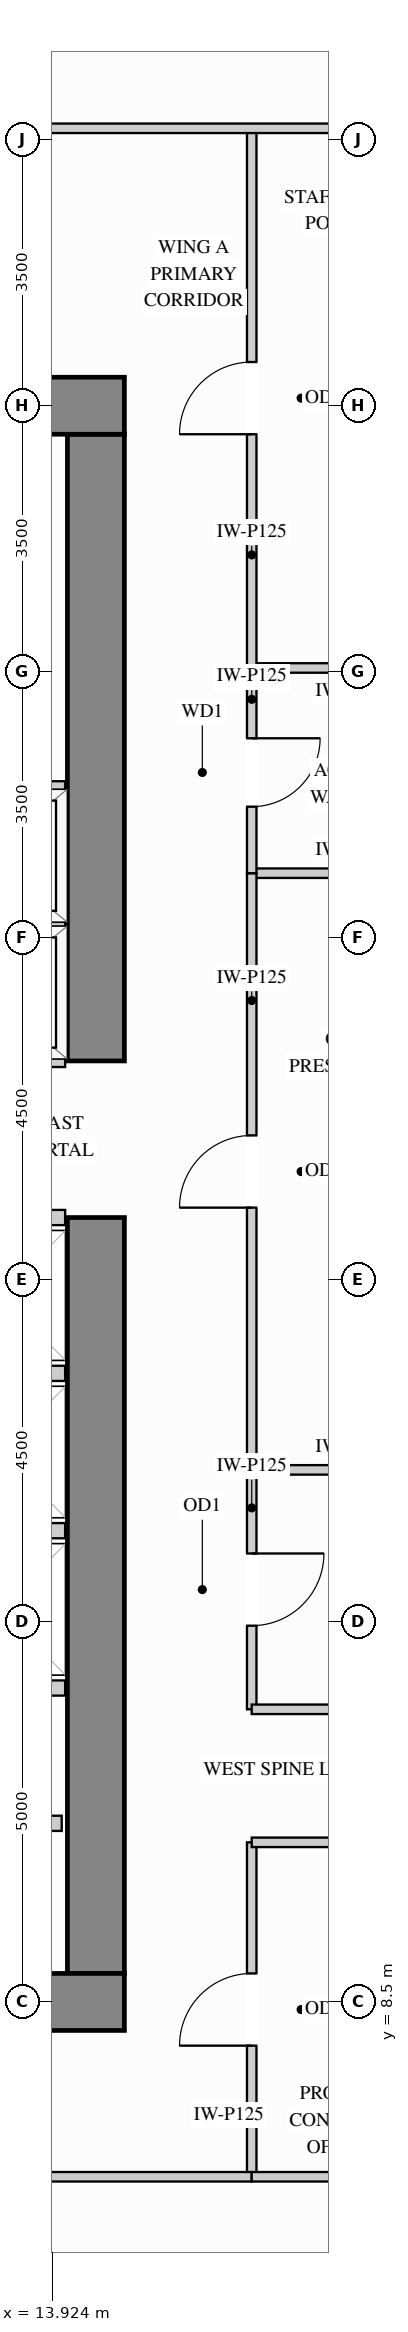
"""IFC4 building model, lengths in metres.
Left out: names, types, materials, properties, quantities, classifications, styles, units other than length and angle.
Written with IfcOpenShell. Run it as: python <this file> out.ifc"""

import sys

from ifc_helpers import new_model, si_unit, direction, frame, frame_2d, origin, place, context, subcontext, project, spatial, rectangle, extrude, source, transform, mapped, element, fill, save


model = new_model("IFC4")
c1 = context("Model", 3, precision=1e-05, world=origin(), true_north=direction((0.0, 1.0)))
c2 = subcontext(c1, "Body", "Model", "MODEL_VIEW")
j1 = project(units=[si_unit("LENGTHUNIT", "METRE"), si_unit("PLANEANGLEUNIT", "RADIAN")], contexts=[c1])
p1 = place(None, origin())
s1 = spatial("IfcSite", under=j1, at=p1, CompositionType="ELEMENT")
p2 = place(p1, origin())
s2 = spatial("IfcBuilding", under=s1, at=p2, CompositionType="ELEMENT")
p3 = place(p2, frame((0.0, 0.0, 109.8)))
s3 = spatial("IfcBuildingStorey", under=s2, at=p3, CompositionType="ELEMENT", Elevation=109.8)
m1 = source(origin(), c2, "Body", "SweptSolid", [
    extrude(rectangle(XDim=9.945, YDim=0.75, at=frame_2d((4.973, 0.0))), origin(), (0.0, 0.0, 1.0), 3.38),
])
p4 = place(p3, frame((14.5, 8.875, 0.0), z_axis=(0.0, 0.0, 1.0), x_axis=(0.0, 1.0, 0.0)))
e1 = element("IfcWall", 1, at=p4, inside=s3, PredefinedType="SHEAR", context=c2, shape_type="MappedRepresentation", body=[
    mapped(m1, transform((0.0, 0.0, 0.0), x_axis=(1.0, 0.0, 0.0), y_axis=(0.0, 1.0, 0.0), z_axis=(0.0, 0.0, 1.0))),
])
m2 = source(origin(), c2, "Body", "SweptSolid", [
    extrude(rectangle(XDim=8.245, YDim=0.75, at=frame_2d((4.123, 0.0))), origin(), (0.0, 0.0, 1.0), 3.38),
])
p5 = place(p3, frame((14.5, 20.88, 0.0), z_axis=(0.0, 0.0, 1.0), x_axis=(0.0, 1.0, 0.0)))
e2 = element("IfcWall", 2, at=p5, inside=s3, PredefinedType="SHEAR", context=c2, shape_type="MappedRepresentation", body=[
    mapped(m2, transform((0.0, 0.0, 0.0), x_axis=(1.0, 0.0, 0.0), y_axis=(0.0, 1.0, 0.0), z_axis=(0.0, 0.0, 1.0))),
])
m3 = source(origin(), c2, "Body", "SweptSolid", [
    extrude(rectangle(XDim=10.75, YDim=0.75, at=frame_2d((5.375, 0.0))), origin(), (0.0, 0.0, 1.0), 3.38),
])
for number, where, z_axis, x_axis in (
    (3, (4.125, 29.5, 0.0), (0.0, 0.0, 1.0), (1.0, 0.0, 0.0)),
    (4, (4.125, 8.5, 0.0), (0.0, 0.0, 1.0), (1.0, 0.0, 0.0)),
):
    element("IfcWall", number, at=place(p3, frame(where, z_axis=z_axis, x_axis=x_axis)), inside=s3, PredefinedType="SHEAR", context=c2, shape_type="MappedRepresentation", body=[
        mapped(m3, transform((0.0, 0.0, 0.0), x_axis=(1.0, 0.0, 0.0), y_axis=(0.0, 1.0, 0.0), z_axis=(0.0, 0.0, 1.0))),
    ])
m4 = source(origin(), c2, "Body", "SweptSolid", [
    extrude(rectangle(XDim=2.6, YDim=0.125, at=frame_2d((1.3, 0.0))), origin(), (0.0, 0.0, 1.0), 3.365),
])
p6 = place(p3, frame((16.55, 15.5, 0.0), z_axis=(0.0, 0.0, 1.0), x_axis=(1.0, 0.0, 0.0)))
e5 = element("IfcWall", 5, at=p6, inside=s3, PredefinedType="PARTITIONING", context=c2, shape_type="MappedRepresentation", body=[
    mapped(m4, transform((0.0, 0.0, 0.0), x_axis=(1.0, 0.0, 0.0), y_axis=(0.0, 1.0, 0.0), z_axis=(0.0, 0.0, 1.0))),
])
m5 = source(origin(), c2, "Body", "SweptSolid", [
    extrude(rectangle(XDim=2.598, YDim=0.125, at=frame_2d((1.299, 0.0))), origin(), (0.0, 0.0, 1.0), 3.365),
])
for number, where, z_axis, x_axis in (
    (6, (16.55, 23.35, 0.0), (0.0, 0.0, 1.0), (1.0, 0.0, 0.0)),
    (7, (16.55, 26.05, 0.0), (0.0, 0.0, 1.0), (1.0, 0.0, 0.0)),
):
    element("IfcWall", number, at=place(p3, frame(where, z_axis=z_axis, x_axis=x_axis)), inside=s3, PredefinedType="PARTITIONING", context=c2, shape_type="MappedRepresentation", body=[
        mapped(m5, transform((0.0, 0.0, 0.0), x_axis=(1.0, 0.0, 0.0), y_axis=(0.0, 1.0, 0.0), z_axis=(0.0, 0.0, 1.0))),
    ])
p7 = place(p3, frame((16.55, 12.35, 0.0), z_axis=(0.0, 0.0, 1.0), x_axis=(0.0, 1.0, 0.0)))
e8 = element("IfcWall", 8, at=p7, inside=s3, PredefinedType="PARTITIONING", context=c2, shape_type="SweptSolid", body=[
    extrude(rectangle(XDim=3.15, YDim=0.125, at=frame_2d((1.575, 0.0))), origin(), (0.0, 0.0, 1.0), 3.365),
])
p8 = place(p7, frame((1.1, 0.0, 0.0)))
e9 = element("IfcOpeningElement", 9, at=p8, cuts=e8, PredefinedType="OPENING", context=c2, shape_type="SweptSolid", body=[
    extrude(rectangle(XDim=0.95, YDim=2.15, at=frame_2d((0.475, 1.075))), frame((0.0, 0.073, 0.0), z_axis=(0.0, -1.0, 0.0), x_axis=(1.0, 0.0, 0.0)), (0.0, 0.0, 1.0), 0.145),
])
p9 = place(p3, frame((16.55, 15.5, 0.0), z_axis=(0.0, 0.0, 1.0), x_axis=(0.0, 1.0, 0.0)))
e10 = element("IfcWall", 10, at=p9, inside=s3, PredefinedType="PARTITIONING", context=c2, shape_type="SweptSolid", body=[
    extrude(rectangle(XDim=7.85, YDim=0.125, at=frame_2d((3.925, 0.0))), origin(), (0.0, 0.0, 1.0), 3.365),
])
p10 = place(p9, frame((3.45, 0.0, 0.0)))
e11 = element("IfcOpeningElement", 11, at=p10, cuts=e10, PredefinedType="OPENING", context=c2, shape_type="SweptSolid", body=[
    extrude(rectangle(XDim=0.95, YDim=2.15, at=frame_2d((0.475, 1.075))), frame((0.0, 0.073, 0.0), z_axis=(0.0, -1.0, 0.0), x_axis=(1.0, 0.0, 0.0)), (0.0, 0.0, 1.0), 0.145),
])
p11 = place(p3, frame((16.55, 26.05, 0.0), z_axis=(0.0, 0.0, 1.0), x_axis=(0.0, 1.0, 0.0)))
e12 = element("IfcWall", 12, at=p11, inside=s3, PredefinedType="PARTITIONING", context=c2, shape_type="SweptSolid", body=[
    extrude(rectangle(XDim=7.1, YDim=0.125, at=frame_2d((3.55, 0.0))), origin(), (0.0, 0.0, 1.0), 3.365),
])
p12 = place(p11, frame((3.075, 0.0, 0.0)))
e13 = element("IfcOpeningElement", 13, at=p12, cuts=e12, PredefinedType="OPENING", context=c2, shape_type="SweptSolid", body=[
    extrude(rectangle(XDim=0.95, YDim=2.15, at=frame_2d((0.475, 1.075))), frame((0.0, 0.073, 0.0), z_axis=(0.0, -1.0, 0.0), x_axis=(1.0, 0.0, 0.0)), (0.0, 0.0, 1.0), 0.145),
])
p13 = place(p3, frame((16.55, 6.2, 0.0), z_axis=(0.0, 0.0, 1.0), x_axis=(0.0, 1.0, 0.0)))
e14 = element("IfcWall", 14, at=p13, inside=s3, PredefinedType="PARTITIONING", context=c2, shape_type="SweptSolid", body=[
    extrude(rectangle(XDim=4.4, YDim=0.125, at=frame_2d((2.2, 0.0))), origin(), (0.0, 0.0, 1.0), 3.365),
])
p14 = place(p13, frame((1.725, 0.0, 0.0)))
e15 = element("IfcOpeningElement", 15, at=p14, cuts=e14, PredefinedType="OPENING", context=c2, shape_type="SweptSolid", body=[
    extrude(rectangle(XDim=0.95, YDim=2.15, at=frame_2d((0.475, 1.075))), frame((0.0, 0.073, 0.0), z_axis=(0.0, -1.0, 0.0), x_axis=(1.0, 0.0, 0.0)), (0.0, 0.0, 1.0), 0.145),
])
p15 = place(p3, frame((16.55, 23.35, 0.0), z_axis=(0.0, 0.0, 1.0), x_axis=(0.0, 1.0, 0.0)))
e16 = element("IfcWall", 16, at=p15, inside=s3, PredefinedType="PARTITIONING", context=c2, shape_type="SweptSolid", body=[
    extrude(rectangle(XDim=2.7, YDim=0.125, at=frame_2d((1.35, 0.0))), origin(), (0.0, 0.0, 1.0), 3.365),
])
p16 = place(p15, frame((0.875, 0.0, 0.0)))
e17 = element("IfcOpeningElement", 17, at=p16, cuts=e16, PredefinedType="OPENING", context=c2, shape_type="SweptSolid", body=[
    extrude(rectangle(XDim=0.9, YDim=2.15, at=frame_2d((0.45, 1.075))), frame((0.0, 0.073, 0.0), z_axis=(0.0, -1.0, 0.0), x_axis=(1.0, 0.0, 0.0)), (0.0, 0.0, 1.0), 0.145),
])
m6 = source(origin(), c2, "Body", "SweptSolid", [
    extrude(rectangle(XDim=12.598, YDim=0.125, at=frame_2d((6.299, 0.0))), origin(), (0.0, 0.0, 1.0), 3.365),
])
p17 = place(p3, frame((6.55, 33.15, 0.0), z_axis=(0.0, 0.0, 1.0), x_axis=(1.0, 0.0, 0.0)))
e18 = element("IfcWall", 18, at=p17, inside=s3, PredefinedType="PARTITIONING", context=c2, shape_type="MappedRepresentation", body=[
    mapped(m6, transform((0.0, 0.0, 0.0), x_axis=(1.0, 0.0, 0.0), y_axis=(0.0, 1.0, 0.0), z_axis=(0.0, 0.0, 1.0))),
])
m7 = source(origin(), c2, "Body", "SweptSolid", [
    extrude(rectangle(XDim=2.95, YDim=0.125, at=frame_2d((1.475, 0.0))), origin(), (0.0, 0.0, 1.0), 3.365),
])
for number, where, z_axis, x_axis in (
    (19, (16.55, 12.35, 0.0), (0.0, 0.0, 1.0), (1.0, 0.0, 0.0)),
    (20, (16.55, 10.6, 0.0), (0.0, 0.0, 1.0), (1.0, 0.0, 0.0)),
):
    element("IfcWall", number, at=place(p3, frame(where, z_axis=z_axis, x_axis=x_axis)), inside=s3, PredefinedType="PARTITIONING", context=c2, shape_type="MappedRepresentation", body=[
        mapped(m7, transform((0.0, 0.0, 0.0), x_axis=(1.0, 0.0, 0.0), y_axis=(0.0, 1.0, 0.0), z_axis=(0.0, 0.0, 1.0))),
    ])
p18 = place(p3, frame((2.45, 6.2, 0.0), z_axis=(0.0, 0.0, 1.0), x_axis=(1.0, 0.0, 0.0)))
e21 = element("IfcWall", 21, at=p18, inside=s3, PredefinedType="PARTITIONING", context=c2, shape_type="SweptSolid", body=[
    extrude(rectangle(XDim=14.1, YDim=0.125, at=frame_2d((7.05, 0.0))), origin(), (0.0, 0.0, 1.0), 2.828),
])
p19 = place(p18, frame((6.575, 0.0, 0.0)))
e22 = element("IfcOpeningElement", 22, at=p19, cuts=e21, PredefinedType="OPENING", context=c2, shape_type="SweptSolid", body=[
    extrude(rectangle(XDim=0.95, YDim=2.15, at=frame_2d((0.475, 1.075))), frame((0.0, 0.073, 0.0), z_axis=(0.0, -1.0, 0.0), x_axis=(1.0, 0.0, 0.0)), (0.0, 0.0, 1.0), 0.145),
])
m8 = source(origin(), c2, "Body", "SweptSolid", [
    extrude(rectangle(XDim=2.598, YDim=0.125, at=frame_2d((1.299, 0.0))), origin(), (0.0, 0.0, 1.0), 2.828),
])
p20 = place(p3, frame((16.55, 6.2, 0.0), z_axis=(0.0, 0.0, 1.0), x_axis=(1.0, 0.0, 0.0)))
e23 = element("IfcWall", 23, at=p20, inside=s3, PredefinedType="PARTITIONING", context=c2, shape_type="MappedRepresentation", body=[
    mapped(m8, transform((0.0, 0.0, 0.0), x_axis=(1.0, 0.0, 0.0), y_axis=(0.0, 1.0, 0.0), z_axis=(0.0, 0.0, 1.0))),
])
m9 = source(origin(), c2, "Body", "SweptSolid", [
    extrude(rectangle(XDim=1.63, YDim=0.2, at=frame_2d((0.815, 0.0))), origin(), (0.0, 0.0, 1.0), 3.365),
])
p21 = place(p3, frame((12.42, 10.85, 0.0), z_axis=(0.0, 0.0, 1.0), x_axis=(1.0, 0.0, 0.0)))
e24 = element("IfcWall", 24, at=p21, inside=s3, PredefinedType="PARTITIONING", context=c2, shape_type="MappedRepresentation", body=[
    mapped(m9, transform((0.0, 0.0, 0.0), x_axis=(1.0, 0.0, 0.0), y_axis=(0.0, 1.0, 0.0), z_axis=(0.0, 0.0, 1.0))),
])
m10 = source(origin(), c2, "Body", "SweptSolid", [
    extrude(rectangle(XDim=2.265, YDim=0.2, at=frame_2d((1.132, 0.0))), origin(), (0.0, 0.0, 1.0), 3.365),
])
for number, where, z_axis, x_axis in (
    (25, (11.83, 22.66, 0.0), (0.0, 0.0, 1.0), (1.0, 0.0, 0.0)),
    (26, (11.83, 20.9, 0.0), (0.0, 0.0, 1.0), (1.0, 0.0, 0.0)),
    (27, (11.83, 24.46, 0.0), (0.0, 0.0, 1.0), (1.0, 0.0, 0.0)),
):
    element("IfcWall", number, at=place(p3, frame(where, z_axis=z_axis, x_axis=x_axis)), inside=s3, PredefinedType="PARTITIONING", context=c2, shape_type="MappedRepresentation", body=[
        mapped(m10, transform((0.0, 0.0, 0.0), x_axis=(1.0, 0.0, 0.0), y_axis=(0.0, 1.0, 0.0), z_axis=(0.0, 0.0, 1.0))),
    ])
m11 = source(origin(), c2, "Body", "SweptSolid", [
    extrude(rectangle(XDim=1.865, YDim=0.2, at=frame_2d((0.933, 0.0))), origin(), (0.0, 0.0, 1.0), 3.365),
])
for number, where, z_axis, x_axis in (
    (28, (12.23, 14.7, 0.0), (0.0, 0.0, 1.0), (1.0, 0.0, 0.0)),
    (29, (12.23, 12.63, 0.0), (0.0, 0.0, 1.0), (1.0, 0.0, 0.0)),
    (30, (12.23, 16.77, 0.0), (0.0, 0.0, 1.0), (1.0, 0.0, 0.0)),
    (31, (12.23, 18.82, 0.0), (0.0, 0.0, 1.0), (1.0, 0.0, 0.0)),
):
    element("IfcWall", number, at=place(p3, frame(where, z_axis=z_axis, x_axis=x_axis)), inside=s3, PredefinedType="PARTITIONING", context=c2, shape_type="MappedRepresentation", body=[
        mapped(m11, transform((0.0, 0.0, 0.0), x_axis=(1.0, 0.0, 0.0), y_axis=(0.0, 1.0, 0.0), z_axis=(0.0, 0.0, 1.0))),
    ])
m12 = source(origin(), c2, "Body", "SweptSolid", [
    extrude(rectangle(XDim=0.95, YDim=2.15, at=frame_2d((0.475, 1.075))), frame((0.0, 0.025, 0.0), z_axis=(0.0, -1.0, 0.0), x_axis=(1.0, 0.0, 0.0)), (0.0, 0.0, 1.0), 0.05),
])
p22 = place(p14, origin())
e32 = element("IfcDoor", 32, at=p22, inside=s3, OperationType="SINGLE_SWING_LEFT", PredefinedType="DOOR", context=c2, shape_type="MappedRepresentation", body=[
    mapped(m12, transform((0.0, 0.0, 0.0), x_axis=(1.0, 0.0, 0.0), y_axis=(0.0, 1.0, 0.0), z_axis=(0.0, 0.0, 1.0))),
])
fill(e15, e32)
p23 = place(p8, origin())
e33 = element("IfcDoor", 33, at=p23, inside=s3, OperationType="SINGLE_SWING_RIGHT", PredefinedType="DOOR", context=c2, shape_type="MappedRepresentation", body=[
    mapped(m12, transform((0.0, 0.0, 0.0), x_axis=(1.0, 0.0, 0.0), y_axis=(0.0, 1.0, 0.0), z_axis=(0.0, 0.0, 1.0))),
])
fill(e9, e33)
p24 = place(p10, origin())
e34 = element("IfcDoor", 34, at=p24, inside=s3, OperationType="SINGLE_SWING_LEFT", PredefinedType="DOOR", context=c2, shape_type="MappedRepresentation", body=[
    mapped(m12, transform((0.0, 0.0, 0.0), x_axis=(1.0, 0.0, 0.0), y_axis=(0.0, 1.0, 0.0), z_axis=(0.0, 0.0, 1.0))),
])
fill(e11, e34)
p25 = place(p12, origin())
e35 = element("IfcDoor", 35, at=p25, inside=s3, OperationType="SINGLE_SWING_LEFT", PredefinedType="DOOR", context=c2, shape_type="MappedRepresentation", body=[
    mapped(m12, transform((0.0, 0.0, 0.0), x_axis=(1.0, 0.0, 0.0), y_axis=(0.0, 1.0, 0.0), z_axis=(0.0, 0.0, 1.0))),
])
fill(e13, e35)
m13 = source(origin(), c2, "Body", "SweptSolid", [
    extrude(rectangle(XDim=0.9, YDim=2.15, at=frame_2d((0.45, 1.075))), frame((0.0, 0.025, 0.0), z_axis=(0.0, -1.0, 0.0), x_axis=(1.0, 0.0, 0.0)), (0.0, 0.0, 1.0), 0.05),
])
p26 = place(p16, origin())
e36 = element("IfcDoor", 36, at=p26, inside=s3, OperationType="SINGLE_SWING_RIGHT", PredefinedType="DOOR", context=c2, shape_type="MappedRepresentation", body=[
    mapped(m13, transform((0.0, 0.0, 0.0), x_axis=(1.0, 0.0, 0.0), y_axis=(0.0, 1.0, 0.0), z_axis=(0.0, 0.0, 1.0))),
])
fill(e17, e36)
save(model, sys.argv[1])
